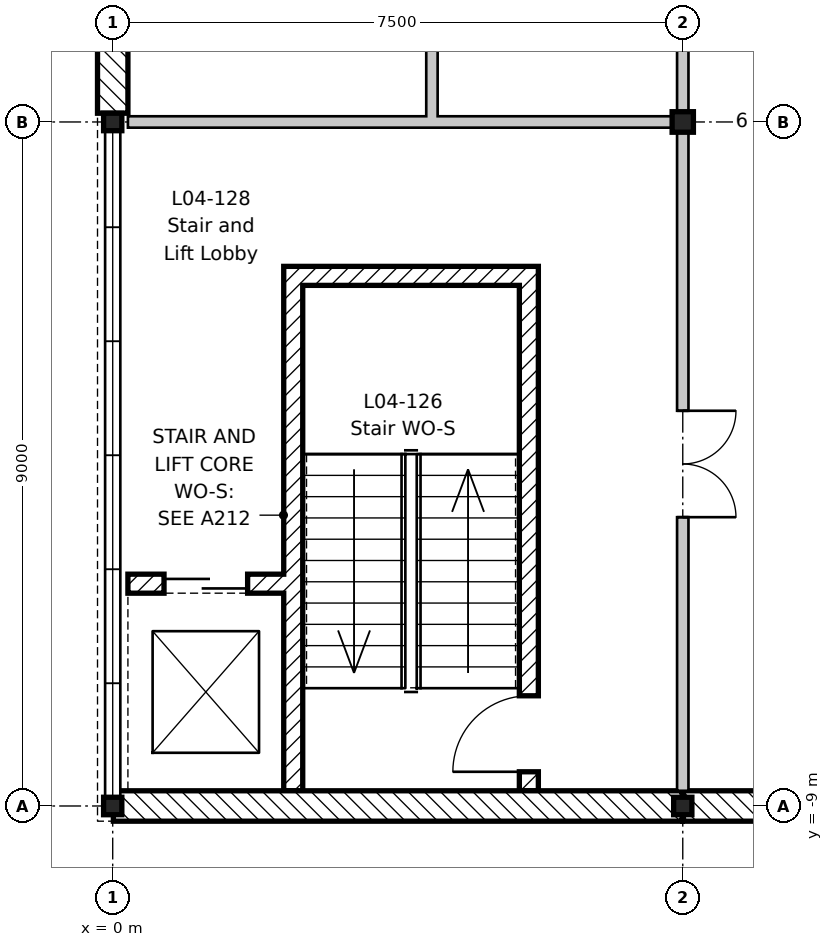
"""IFC4 building model, lengths in metres.
Left out: names, types, materials, properties, quantities, classifications, styles, units other than length and angle.
Written with IfcOpenShell. Run it as: python <this file> out.ifc"""

import sys

from ifc_helpers import new_model, si_unit, direction, frame, frame_2d, origin, origin_2d, place, context, subcontext, project, spatial, rectangle, i_section, extrude, element, fill, save


model = new_model("IFC4")
c1 = context("Model", 3, precision=1e-05, world=origin(), true_north=direction((0.0, 1.0)))
c2 = subcontext(c1, "Body", "Model", "MODEL_VIEW")
j1 = project(units=[si_unit("LENGTHUNIT", "METRE"), si_unit("PLANEANGLEUNIT", "RADIAN")], contexts=[c1])
p1 = place(None, origin())
s1 = spatial("IfcSite", under=j1, at=p1, CompositionType="ELEMENT")
p2 = place(p1, origin())
s2 = spatial("IfcBuilding", under=s1, at=p2, CompositionType="ELEMENT")
p3 = place(p2, frame((0.0, 0.0, 18.6)))
s3 = spatial("IfcBuildingStorey", under=s2, at=p3, CompositionType="ELEMENT", Elevation=18.6)
for number, where, z_axis, x_axis in (
    (1, (0.0, -9.0, -0.2), (0.0, 0.0, 1.0), (1.0, 0.0, 0.0)),
    (2, (0.0, 0.0, -0.2), (0.0, 0.0, 1.0), (1.0, 0.0, 0.0)),
    (3, (7.5, -9.0, -0.2), (0.0, 0.0, 1.0), (1.0, 0.0, 0.0)),
):
    element("IfcColumn", number, at=place(p3, frame(where, z_axis=z_axis, x_axis=x_axis)), inside=s3, PredefinedType="COLUMN", context=c2, shape_type="SweptSolid", body=[
        extrude(i_section(OverallWidth=0.24, OverallDepth=0.23, WebThickness=0.008, FlangeThickness=0.012, FilletRadius=0.021, at=origin_2d()), origin(), (0.0, 0.0, 1.0), 4.2),
    ])
p4 = place(p3, frame((7.5, 0.0, -0.2), z_axis=(0.0, 0.0, 1.0), x_axis=(1.0, 0.0, 0.0)))
e4 = element("IfcColumn", 4, at=p4, inside=s3, PredefinedType="COLUMN", context=c2, shape_type="SweptSolid", body=[
    extrude(i_section(OverallWidth=0.28, OverallDepth=0.27, WebThickness=0.008, FlangeThickness=0.013, FilletRadius=0.024, at=origin_2d()), origin(), (0.0, 0.0, 1.0), 4.2),
])
p5 = place(p3, frame((2.375, -8.8, 0.0), z_axis=(0.0, 0.0, 1.0), x_axis=(0.0, 1.0, 0.0)))
e5 = element("IfcWall", 5, at=p5, inside=s3, PredefinedType="SHEAR", context=c2, shape_type="SweptSolid", body=[
    extrude(rectangle(XDim=6.9, YDim=0.25, at=frame_2d((3.45, 0.0))), origin(), (0.0, 0.0, 1.0), 4.0),
])
p6 = place(p3, frame((5.475, -8.8, 0.0), z_axis=(0.0, 0.0, 1.0), x_axis=(0.0, 1.0, 0.0)))
e6 = element("IfcWall", 6, at=p6, inside=s3, PredefinedType="SHEAR", context=c2, shape_type="SweptSolid", body=[
    extrude(rectangle(XDim=6.9, YDim=0.25, at=frame_2d((3.45, 0.0))), origin(), (0.0, 0.0, 1.0), 4.0),
])
p7 = place(p6, frame((0.25, 0.0, 0.0)))
e7 = element("IfcOpeningElement", 7, at=p7, cuts=e6, PredefinedType="OPENING", context=c2, shape_type="SweptSolid", body=[
    extrude(rectangle(XDim=1.0, YDim=2.1, at=frame_2d((0.5, 1.05))), frame((0.0, 0.135, 0.0), z_axis=(0.0, -1.0, 0.0), x_axis=(1.0, 0.0, 0.0)), (0.0, 0.0, 1.0), 0.27),
])
p8 = place(p3, frame((2.5, -2.025, 0.0), z_axis=(0.0, 0.0, 1.0), x_axis=(1.0, 0.0, 0.0)))
e8 = element("IfcWall", 8, at=p8, inside=s3, PredefinedType="SHEAR", context=c2, shape_type="SweptSolid", body=[
    extrude(rectangle(XDim=2.85, YDim=0.25, at=frame_2d((1.425, 0.0))), origin(), (0.0, 0.0, 1.0), 4.0),
])
p9 = place(p3, frame((0.2, -6.075, 0.0), z_axis=(0.0, 0.0, 1.0), x_axis=(1.0, 0.0, 0.0)))
e9 = element("IfcWall", 9, at=p9, inside=s3, PredefinedType="SHEAR", context=c2, shape_type="SweptSolid", body=[
    extrude(rectangle(XDim=2.05, YDim=0.25, at=frame_2d((1.025, 0.0))), origin(), (0.0, 0.0, 1.0), 4.0),
])
p10 = place(p9, frame((0.475, 0.0, 0.0)))
e10 = element("IfcOpeningElement", 10, at=p10, cuts=e9, PredefinedType="OPENING", context=c2, shape_type="SweptSolid", body=[
    extrude(rectangle(XDim=1.1, YDim=2.1, at=frame_2d((0.55, 1.05))), frame((0.0, 0.135, 0.0), z_axis=(0.0, -1.0, 0.0), x_axis=(1.0, 0.0, 0.0)), (0.0, 0.0, 1.0), 0.27),
])
p11 = place(p3, frame((0.0, 0.115, 0.0), z_axis=(0.0, 0.0, 1.0), x_axis=(0.0, 1.0, 0.0)))
e11 = element("IfcWall", 11, at=p11, inside=s3, PredefinedType="STANDARD", context=c2, shape_type="SweptSolid", body=[
    extrude(rectangle(XDim=8.77, YDim=0.4, at=frame_2d((4.385, 0.0))), origin(), (0.0, 0.0, 1.0), 3.6),
])
p12 = place(p11, frame((1.835, 0.0, 1.5)))
e12 = element("IfcOpeningElement", 12, at=p12, cuts=e11, PredefinedType="OPENING", context=c2, shape_type="SweptSolid", body=[
    extrude(rectangle(XDim=0.6, YDim=1.2, at=frame_2d((0.3, 0.6))), frame((0.0, 0.21, 0.0), z_axis=(0.0, -1.0, 0.0), x_axis=(1.0, 0.0, 0.0)), (0.0, 0.0, 1.0), 0.42),
])
p13 = place(p11, frame((3.335, 0.0, 1.5)))
e13 = element("IfcOpeningElement", 13, at=p13, cuts=e11, PredefinedType="OPENING", context=c2, shape_type="SweptSolid", body=[
    extrude(rectangle(XDim=0.6, YDim=1.2, at=frame_2d((0.3, 0.6))), frame((0.0, 0.21, 0.0), z_axis=(0.0, -1.0, 0.0), x_axis=(1.0, 0.0, 0.0)), (0.0, 0.0, 1.0), 0.42),
])
p14 = place(p11, frame((4.835, 0.0, 1.5)))
e14 = element("IfcOpeningElement", 14, at=p14, cuts=e11, PredefinedType="OPENING", context=c2, shape_type="SweptSolid", body=[
    extrude(rectangle(XDim=0.6, YDim=1.2, at=frame_2d((0.3, 0.6))), frame((0.0, 0.21, 0.0), z_axis=(0.0, -1.0, 0.0), x_axis=(1.0, 0.0, 0.0)), (0.0, 0.0, 1.0), 0.42),
])
p15 = place(p11, frame((6.335, 0.0, 1.5)))
e15 = element("IfcOpeningElement", 15, at=p15, cuts=e11, PredefinedType="OPENING", context=c2, shape_type="SweptSolid", body=[
    extrude(rectangle(XDim=0.6, YDim=1.2, at=frame_2d((0.3, 0.6))), frame((0.0, 0.21, 0.0), z_axis=(0.0, -1.0, 0.0), x_axis=(1.0, 0.0, 0.0)), (0.0, 0.0, 1.0), 0.42),
])
p16 = place(p3, frame((7.491, -9.0, 0.0), z_axis=(0.0, 0.0, 1.0), x_axis=(-1.0, 0.0, 0.0)))
e16 = element("IfcWall", 16, at=p16, inside=s3, PredefinedType="STANDARD", context=c2, shape_type="SweptSolid", body=[
    extrude(rectangle(XDim=7.482, YDim=0.4, at=frame_2d((3.741, 0.0))), origin(), (0.0, 0.0, 1.0), 3.67),
])
p17 = place(p3, frame((10.491, -9.0, 0.0), z_axis=(0.0, 0.0, 1.0), x_axis=(-1.0, 0.0, 0.0)))
e17 = element("IfcWall", 17, at=p17, inside=s3, PredefinedType="STANDARD", context=c2, shape_type="SweptSolid", body=[
    extrude(rectangle(XDim=2.982, YDim=0.4, at=frame_2d((1.491, 0.0))), origin(), (0.0, 0.0, 1.0), 3.8),
])
p18 = place(p3, frame((0.2, 0.0, 0.0), z_axis=(0.0, 0.0, 1.0), x_axis=(1.0, 0.0, 0.0)))
e18 = element("IfcWall", 18, at=p18, inside=s3, PredefinedType="PARTITIONING", context=c2, shape_type="SweptSolid", body=[
    extrude(rectangle(XDim=7.225, YDim=0.15, at=frame_2d((3.613, 0.0))), origin(), (0.0, 0.0, 1.0), 3.65),
])
p19 = place(p3, frame((7.5, -8.8, 0.0), z_axis=(0.0, 0.0, 1.0), x_axis=(0.0, 1.0, 0.0)))
e19 = element("IfcWall", 19, at=p19, inside=s3, PredefinedType="PARTITIONING", context=c2, shape_type="SweptSolid", body=[
    extrude(rectangle(XDim=79.3, YDim=0.15, at=frame_2d((39.65, 0.0))), origin(), (0.0, 0.0, 1.0), 3.48),
])
p20 = place(p19, frame((20.3, 0.0, 0.0)))
e20 = element("IfcOpeningElement", 20, at=p20, cuts=e19, PredefinedType="OPENING", context=c2, shape_type="SweptSolid", body=[
    extrude(rectangle(XDim=1.0, YDim=2.1, at=frame_2d((0.5, 1.05))), frame((0.0, 0.085, 0.0), z_axis=(0.0, -1.0, 0.0), x_axis=(1.0, 0.0, 0.0)), (0.0, 0.0, 1.0), 0.17),
])
p21 = place(p19, frame((24.8, 0.0, 0.0)))
e21 = element("IfcOpeningElement", 21, at=p21, cuts=e19, PredefinedType="OPENING", context=c2, shape_type="SweptSolid", body=[
    extrude(rectangle(XDim=1.0, YDim=2.1, at=frame_2d((0.5, 1.05))), frame((0.0, 0.085, 0.0), z_axis=(0.0, -1.0, 0.0), x_axis=(1.0, 0.0, 0.0)), (0.0, 0.0, 1.0), 0.17),
])
p22 = place(p19, frame((30.6, 0.0, 0.0)))
e22 = element("IfcOpeningElement", 22, at=p22, cuts=e19, PredefinedType="OPENING", context=c2, shape_type="SweptSolid", body=[
    extrude(rectangle(XDim=1.4, YDim=2.1, at=frame_2d((0.7, 1.05))), frame((0.0, 0.085, 0.0), z_axis=(0.0, -1.0, 0.0), x_axis=(1.0, 0.0, 0.0)), (0.0, 0.0, 1.0), 0.17),
])
p23 = place(p19, frame((47.3, 0.0, 0.0)))
e23 = element("IfcOpeningElement", 23, at=p23, cuts=e19, PredefinedType="OPENING", context=c2, shape_type="SweptSolid", body=[
    extrude(rectangle(XDim=1.0, YDim=2.1, at=frame_2d((0.5, 1.05))), frame((0.0, 0.085, 0.0), z_axis=(0.0, -1.0, 0.0), x_axis=(1.0, 0.0, 0.0)), (0.0, 0.0, 1.0), 0.17),
])
p24 = place(p19, frame((51.8, 0.0, 0.0)))
e24 = element("IfcOpeningElement", 24, at=p24, cuts=e19, PredefinedType="OPENING", context=c2, shape_type="SweptSolid", body=[
    extrude(rectangle(XDim=1.0, YDim=2.1, at=frame_2d((0.5, 1.05))), frame((0.0, 0.085, 0.0), z_axis=(0.0, -1.0, 0.0), x_axis=(1.0, 0.0, 0.0)), (0.0, 0.0, 1.0), 0.17),
])
p25 = place(p19, frame((54.8, 0.0, 0.0)))
e25 = element("IfcOpeningElement", 25, at=p25, cuts=e19, PredefinedType="OPENING", context=c2, shape_type="SweptSolid", body=[
    extrude(rectangle(XDim=1.0, YDim=2.1, at=frame_2d((0.5, 1.05))), frame((0.0, 0.085, 0.0), z_axis=(0.0, -1.0, 0.0), x_axis=(1.0, 0.0, 0.0)), (0.0, 0.0, 1.0), 0.17),
])
p26 = place(p19, frame((59.3, 0.0, 0.0)))
e26 = element("IfcOpeningElement", 26, at=p26, cuts=e19, PredefinedType="OPENING", context=c2, shape_type="SweptSolid", body=[
    extrude(rectangle(XDim=1.0, YDim=2.1, at=frame_2d((0.5, 1.05))), frame((0.0, 0.085, 0.0), z_axis=(0.0, -1.0, 0.0), x_axis=(1.0, 0.0, 0.0)), (0.0, 0.0, 1.0), 0.17),
])
p27 = place(p19, frame((12.6, 0.0, 0.0)))
e27 = element("IfcOpeningElement", 27, at=p27, cuts=e19, PredefinedType="OPENING", context=c2, shape_type="SweptSolid", body=[
    extrude(rectangle(XDim=1.4, YDim=2.1, at=frame_2d((0.7, 1.05))), frame((0.0, 0.085, 0.0), z_axis=(0.0, -1.0, 0.0), x_axis=(1.0, 0.0, 0.0)), (0.0, 0.0, 1.0), 0.17),
])
p28 = place(p19, frame((3.6, 0.0, 0.0)))
e28 = element("IfcOpeningElement", 28, at=p28, cuts=e19, PredefinedType="OPENING", context=c2, shape_type="SweptSolid", body=[
    extrude(rectangle(XDim=1.4, YDim=2.1, at=frame_2d((0.7, 1.05))), frame((0.0, 0.085, 0.0), z_axis=(0.0, -1.0, 0.0), x_axis=(1.0, 0.0, 0.0)), (0.0, 0.0, 1.0), 0.17),
])
p29 = place(p19, frame((63.55, 0.0, 0.0)))
e29 = element("IfcOpeningElement", 29, at=p29, cuts=e19, PredefinedType="OPENING", context=c2, shape_type="SweptSolid", body=[
    extrude(rectangle(XDim=1.4, YDim=2.1, at=frame_2d((0.7, 1.05))), frame((0.0, 0.085, 0.0), z_axis=(0.0, -1.0, 0.0), x_axis=(1.0, 0.0, 0.0)), (0.0, 0.0, 1.0), 0.17),
])
p30 = place(p19, frame((69.6, 0.0, 0.0)))
e30 = element("IfcOpeningElement", 30, at=p30, cuts=e19, PredefinedType="OPENING", context=c2, shape_type="SweptSolid", body=[
    extrude(rectangle(XDim=1.4, YDim=2.1, at=frame_2d((0.7, 1.05))), frame((0.0, 0.085, 0.0), z_axis=(0.0, -1.0, 0.0), x_axis=(1.0, 0.0, 0.0)), (0.0, 0.0, 1.0), 0.17),
])
p31 = place(p19, frame((42.85, 0.0, 0.0)))
e31 = element("IfcOpeningElement", 31, at=p31, cuts=e19, PredefinedType="OPENING", context=c2, shape_type="SweptSolid", body=[
    extrude(rectangle(XDim=1.0, YDim=2.1, at=frame_2d((0.5, 1.05))), frame((0.0, 0.085, 0.0), z_axis=(0.0, -1.0, 0.0), x_axis=(1.0, 0.0, 0.0)), (0.0, 0.0, 1.0), 0.17),
])
p32 = place(p19, frame((36.55, 0.0, 0.0)))
e32 = element("IfcOpeningElement", 32, at=p32, cuts=e19, PredefinedType="OPENING", context=c2, shape_type="SweptSolid", body=[
    extrude(rectangle(XDim=1.4, YDim=2.1, at=frame_2d((0.7, 1.05))), frame((0.0, 0.085, 0.0), z_axis=(0.0, -1.0, 0.0), x_axis=(1.0, 0.0, 0.0)), (0.0, 0.0, 1.0), 0.17),
])
p33 = place(p19, frame((72.8, 0.0, 0.0)))
e33 = element("IfcOpeningElement", 33, at=p33, cuts=e19, PredefinedType="OPENING", context=c2, shape_type="SweptSolid", body=[
    extrude(rectangle(XDim=1.0, YDim=2.1, at=frame_2d((0.5, 1.05))), frame((0.0, 0.085, 0.0), z_axis=(0.0, -1.0, 0.0), x_axis=(1.0, 0.0, 0.0)), (0.0, 0.0, 1.0), 0.17),
])
p34 = place(p3, frame((4.2, 0.075, 0.0), z_axis=(0.0, 0.0, 1.0), x_axis=(0.0, 1.0, 0.0)))
e34 = element("IfcWall", 34, at=p34, inside=s3, PredefinedType="PARTITIONING", context=c2, shape_type="SweptSolid", body=[
    extrude(rectangle(XDim=8.85, YDim=0.15, at=frame_2d((4.425, 0.0))), origin(), (0.0, 0.0, 1.0), 4.0),
])
p35 = place(p34, frame((0.975, 0.0, 0.0)))
e35 = element("IfcOpeningElement", 35, at=p35, cuts=e34, PredefinedType="OPENING", context=c2, shape_type="SweptSolid", body=[
    extrude(rectangle(XDim=0.9, YDim=2.1, at=frame_2d((0.45, 1.05))), frame((0.0, 0.085, 0.0), z_axis=(0.0, -1.0, 0.0), x_axis=(1.0, 0.0, 0.0)), (0.0, 0.0, 1.0), 0.17),
])
p36 = place(p34, frame((3.975, 0.0, 0.0)))
e36 = element("IfcOpeningElement", 36, at=p36, cuts=e34, PredefinedType="OPENING", context=c2, shape_type="SweptSolid", body=[
    extrude(rectangle(XDim=0.9, YDim=2.1, at=frame_2d((0.45, 1.05))), frame((0.0, 0.085, 0.0), z_axis=(0.0, -1.0, 0.0), x_axis=(1.0, 0.0, 0.0)), (0.0, 0.0, 1.0), 0.17),
])
p37 = place(p34, frame((6.925, 0.0, 0.0)))
e37 = element("IfcOpeningElement", 37, at=p37, cuts=e34, PredefinedType="OPENING", context=c2, shape_type="SweptSolid", body=[
    extrude(rectangle(XDim=1.0, YDim=2.1, at=frame_2d((0.5, 1.05))), frame((0.0, 0.085, 0.0), z_axis=(0.0, -1.0, 0.0), x_axis=(1.0, 0.0, 0.0)), (0.0, 0.0, 1.0), 0.17),
])
p38 = place(p7, origin())
e38 = element("IfcDoor", 38, at=p38, inside=s3, OperationType="SINGLE_SWING_LEFT", PredefinedType="DOOR", context=c2, shape_type="SweptSolid", body=[
    extrude(rectangle(XDim=1.0, YDim=2.1, at=frame_2d((0.5, 1.05))), frame((0.0, 0.025, 0.0), z_axis=(0.0, -1.0, 0.0), x_axis=(1.0, 0.0, 0.0)), (0.0, 0.0, 1.0), 0.05),
])
fill(e7, e38)
p39 = place(p28, frame((1.4, 0.0, 0.0), z_axis=(0.0, 0.0, 1.0), x_axis=(-1.0, 0.0, 0.0)))
e39 = element("IfcDoor", 39, at=p39, inside=s3, OperationType="DOUBLE_DOOR_SINGLE_SWING", PredefinedType="DOOR", context=c2, shape_type="SweptSolid", body=[
    extrude(rectangle(XDim=1.4, YDim=2.1, at=frame_2d((0.7, 1.05))), frame((0.0, 0.025, 0.0), z_axis=(0.0, -1.0, 0.0), x_axis=(1.0, 0.0, 0.0)), (0.0, 0.0, 1.0), 0.05),
])
fill(e28, e39)
p40 = place(p10, origin())
e40 = element("IfcDoor", 40, at=p40, inside=s3, OperationType="SLIDING_TO_LEFT", PredefinedType="DOOR", context=c2, shape_type="SweptSolid", body=[
    extrude(rectangle(XDim=1.1, YDim=2.1, at=frame_2d((0.55, 1.05))), frame((0.0, 0.025, 0.0), z_axis=(0.0, -1.0, 0.0), x_axis=(1.0, 0.0, 0.0)), (0.0, 0.0, 1.0), 0.05),
])
fill(e10, e40)
save(model, sys.argv[1])
